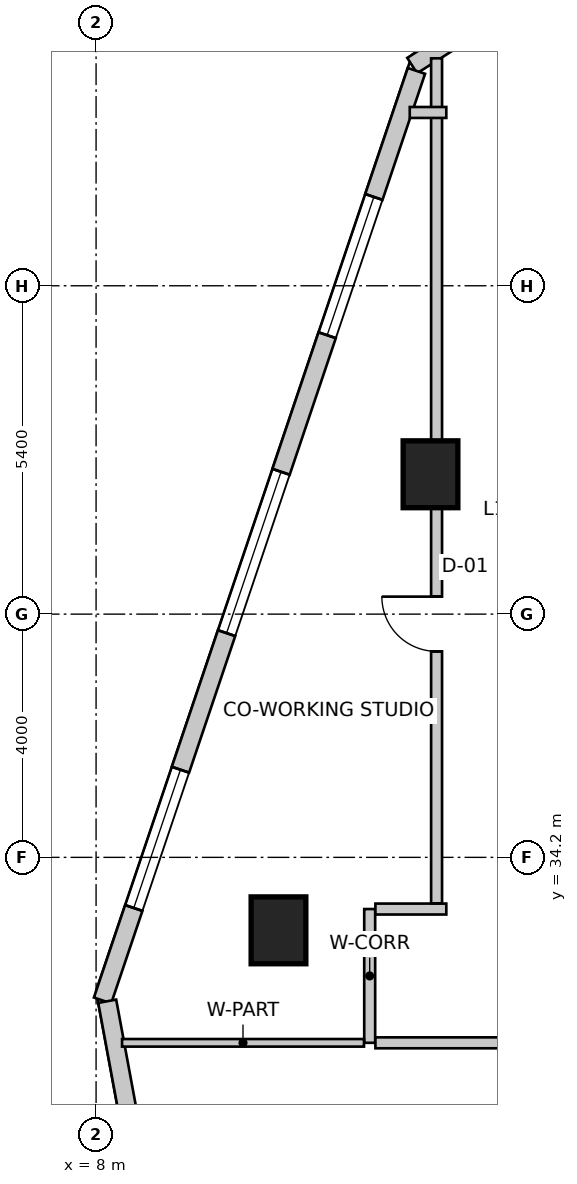
"""IFC4 building model, lengths in metres.
Left out: names, types, materials, properties, quantities, classifications, styles, units other than length and angle.
Written with IfcOpenShell. Run it as: python <this file> out.ifc"""

import sys

from ifc_helpers import new_model, si_unit, direction, frame, frame_2d, origin, origin_2d, place, context, subcontext, project, spatial, rectangle, extrude, source, transform, mapped, element, fill, save


model = new_model("IFC4")
c1 = context("Model", 3, precision=1e-05, world=origin(), true_north=direction((0.0, 1.0)))
c2 = subcontext(c1, "Body", "Model", "MODEL_VIEW")
j1 = project(units=[si_unit("LENGTHUNIT", "METRE"), si_unit("PLANEANGLEUNIT", "RADIAN")], contexts=[c1])
p1 = place(None, origin())
s1 = spatial("IfcSite", under=j1, at=p1, CompositionType="ELEMENT")
p2 = place(p1, origin())
s2 = spatial("IfcBuilding", under=s1, at=p2, CompositionType="ELEMENT")
p3 = place(p2, frame((0.0, 0.0, 79.0)))
s3 = spatial("IfcBuildingStorey", under=s2, at=p3, CompositionType="ELEMENT", Elevation=79.0)
m1 = source(origin(), c2, "Body", "SweptSolid", [
    extrude(rectangle(XDim=0.9, YDim=1.1, at=origin_2d()), origin(), (0.0, 0.0, 1.0), 4.0),
])
for number, where, z_axis, x_axis in (
    (1, (11.0, 33.0, 0.0), (0.0, 0.0, 1.0), (1.0, 0.0, 0.0)),
    (2, (13.5, 40.5, 0.0), (0.0, 0.0, 1.0), (1.0, 0.0, 0.0)),
):
    element("IfcColumn", number, at=place(p3, frame(where, z_axis=z_axis, x_axis=x_axis)), inside=s3, PredefinedType="COLUMN", context=c2, shape_type="MappedRepresentation", body=[
        mapped(m1, transform((0.0, 0.0, 0.0), scale=1.0)),
    ])
p4 = place(p3, frame((21.875, 52.742, 0.0), z_axis=(0.0, 0.0, 1.0), x_axis=(-0.843662465249, -0.536873956092, 0.0)))
e3 = element("IfcWall", 3, at=p4, inside=s3, PredefinedType="SOLIDWALL", context=c2, shape_type="SweptSolid", body=[
    extrude(rectangle(XDim=10.284, YDim=0.3, at=frame_2d((5.142, 0.0))), origin(), (0.0, 0.0, 1.0), 3.75),
])
m2 = source(origin(), c2, "Body", "SweptSolid", [
    extrude(rectangle(XDim=1.2, YDim=1.6, at=frame_2d((0.6, 0.8))), frame((0.0, 0.16, 0.0), z_axis=(0.0, -1.0, 0.0), x_axis=(1.0, 0.0, 0.0)), (0.0, 0.0, 1.0), 0.32),
])
p5 = place(p4, frame((0.479, 0.0, 0.85)))
e4 = element("IfcOpeningElement", 4, at=p5, cuts=e3, PredefinedType="OPENING", context=c2, shape_type="MappedRepresentation", body=[
    mapped(m2, transform((0.0, 0.0, 0.0), scale=1.0)),
])
m3 = source(origin(), c2, "Body", "SweptSolid", [
    extrude(rectangle(XDim=2.8, YDim=2.4, at=frame_2d((1.4, 1.2))), frame((0.0, 0.16, 0.0), z_axis=(0.0, -1.0, 0.0), x_axis=(1.0, 0.0, 0.0)), (0.0, 0.0, 1.0), 0.32),
])
p6 = place(p4, frame((3.342, 0.0, 0.85)))
e5 = element("IfcOpeningElement", 5, at=p6, cuts=e3, PredefinedType="OPENING", context=c2, shape_type="MappedRepresentation", body=[
    mapped(m3, transform((0.0, 0.0, 0.0), scale=1.0)),
])
m4 = source(origin(), c2, "Body", "SweptSolid", [
    extrude(rectangle(XDim=1.8, YDim=2.1, at=frame_2d((0.9, 1.05))), frame((0.0, 0.16, 0.0), z_axis=(0.0, -1.0, 0.0), x_axis=(1.0, 0.0, 0.0)), (0.0, 0.0, 1.0), 0.32),
])
p7 = place(p4, frame((7.753, 0.0, 0.85)))
e6 = element("IfcOpeningElement", 6, at=p7, cuts=e3, PredefinedType="OPENING", context=c2, shape_type="MappedRepresentation", body=[
    mapped(m4, transform((0.0, 0.0, 0.0), scale=1.0)),
])
p8 = place(p3, frame((13.269, 47.134, 0.0), z_axis=(0.0, 0.0, 1.0), x_axis=(-0.319920423265, -0.947444416722, 0.0)))
e7 = element("IfcWall", 7, at=p8, inside=s3, PredefinedType="SOLIDWALL", context=c2, shape_type="SweptSolid", body=[
    extrude(rectangle(XDim=16.135, YDim=0.3, at=frame_2d((8.067, 0.0))), origin(), (0.0, 0.0, 1.0), 3.75),
])
m5 = source(origin(), c2, "Body", "SweptSolid", [
    extrude(rectangle(XDim=2.4, YDim=2.2, at=frame_2d((1.2, 1.1))), frame((0.0, 0.16, 0.0), z_axis=(0.0, -1.0, 0.0), x_axis=(1.0, 0.0, 0.0)), (0.0, 0.0, 1.0), 0.32),
])
p9 = place(p8, frame((2.188, 0.0, 0.85)))
e8 = element("IfcOpeningElement", 8, at=p9, cuts=e7, PredefinedType="OPENING", context=c2, shape_type="MappedRepresentation", body=[
    mapped(m5, transform((0.0, 0.0, 0.0), scale=1.0)),
])
p10 = place(p8, frame((6.959, 0.0, 0.85)))
e9 = element("IfcOpeningElement", 9, at=p10, cuts=e7, PredefinedType="OPENING", context=c2, shape_type="MappedRepresentation", body=[
    mapped(m3, transform((0.0, 0.0, 0.0), scale=1.0)),
])
p11 = place(p8, frame((12.13, 0.0, 0.85)))
e10 = element("IfcOpeningElement", 10, at=p11, cuts=e7, PredefinedType="OPENING", context=c2, shape_type="MappedRepresentation", body=[
    mapped(m5, transform((0.0, 0.0, 0.0), scale=1.0)),
])
p12 = place(p3, frame((8.183, 31.833, 0.0), z_axis=(0.0, 0.0, 1.0), x_axis=(0.18216364648, -0.983268226834, 0.0)))
e11 = element("IfcWall", 11, at=p12, inside=s3, PredefinedType="SOLIDWALL", context=c2, shape_type="SweptSolid", body=[
    extrude(rectangle(XDim=26.678, YDim=0.3, at=frame_2d((13.339, 0.0))), origin(), (0.0, 0.0, 1.0), 3.75),
])
p13 = place(p12, frame((2.952, 0.0, 0.85)))
e12 = element("IfcOpeningElement", 12, at=p13, cuts=e11, PredefinedType="OPENING", context=c2, shape_type="MappedRepresentation", body=[
    mapped(m3, transform((0.0, 0.0, 0.0), scale=1.0)),
])
p14 = place(p12, frame((8.876, 0.0, 0.85)))
e13 = element("IfcOpeningElement", 13, at=p14, cuts=e11, PredefinedType="OPENING", context=c2, shape_type="MappedRepresentation", body=[
    mapped(m3, transform((0.0, 0.0, 0.0), scale=1.0)),
])
p15 = place(p12, frame((13.453, 0.0, 0.85)))
e14 = element("IfcOpeningElement", 14, at=p15, cuts=e11, PredefinedType="OPENING", context=c2, shape_type="MappedRepresentation", body=[
    mapped(m3, transform((0.0, 0.0, 0.0), scale=1.0)),
])
p16 = place(p12, frame((18.211, 0.0, 0.85)))
e15 = element("IfcOpeningElement", 15, at=p16, cuts=e11, PredefinedType="OPENING", context=c2, shape_type="MappedRepresentation", body=[
    mapped(m3, transform((0.0, 0.0, 0.0), scale=1.0)),
])
p17 = place(p12, frame((22.909, 0.0, 0.85)))
e16 = element("IfcOpeningElement", 16, at=p17, cuts=e11, PredefinedType="OPENING", context=c2, shape_type="MappedRepresentation", body=[
    mapped(m5, transform((0.0, 0.0, 0.0), scale=1.0)),
])
p18 = place(p3, frame((12.5, 31.15, 0.0), z_axis=(0.0, 0.0, 1.0), x_axis=(0.0, 1.0, 0.0)))
e17 = element("IfcWall", 17, at=p18, inside=s3, PredefinedType="PARTITIONING", context=c2, shape_type="SweptSolid", body=[
    extrude(rectangle(XDim=2.2, YDim=0.18, at=frame_2d((1.1, 0.0))), origin(), (0.0, 0.0, 1.0), 3.419),
])
p19 = place(p3, frame((12.594, 33.35, 0.0), z_axis=(0.0, 0.0, 1.0), x_axis=(1.0, 0.0, 0.0)))
e18 = element("IfcWall", 18, at=p19, inside=s3, PredefinedType="PARTITIONING", context=c2, shape_type="SweptSolid", body=[
    extrude(rectangle(XDim=1.166, YDim=0.18, at=frame_2d((0.583, 0.0))), origin(), (0.0, 0.0, 1.0), 3.75),
])
p20 = place(p3, frame((17.96, 31.15, 0.0), z_axis=(0.0, 0.0, 1.0), x_axis=(-1.0, 0.0, 0.0)))
e19 = element("IfcWall", 19, at=p20, inside=s3, PredefinedType="PARTITIONING", context=c2, shape_type="SweptSolid", body=[
    extrude(rectangle(XDim=5.366, YDim=0.18, at=frame_2d((2.683, 0.0))), origin(), (0.0, 0.0, 1.0), 3.419),
])
p21 = place(p3, frame((13.6, 33.444, 0.0), z_axis=(0.0, 0.0, 1.0), x_axis=(0.0, 1.0, 0.0)))
e20 = element("IfcWall", 20, at=p21, inside=s3, PredefinedType="PARTITIONING", context=c2, shape_type="SweptSolid", body=[
    extrude(rectangle(XDim=13.896, YDim=0.18, at=frame_2d((6.948, 0.0))), origin(), (0.0, 0.0, 1.0), 2.892),
])
m6 = source(origin(), c2, "Body", "SweptSolid", [
    extrude(rectangle(XDim=0.9, YDim=2.15, at=frame_2d((0.45, 1.075))), frame((0.0, 0.1, 0.0), z_axis=(0.0, -1.0, 0.0), x_axis=(1.0, 0.0, 0.0)), (0.0, 0.0, 1.0), 0.2),
])
p22 = place(p21, frame((4.144, 0.0, 0.0)))
e21 = element("IfcOpeningElement", 21, at=p22, cuts=e20, PredefinedType="OPENING", context=c2, shape_type="MappedRepresentation", body=[
    mapped(m6, transform((0.0, 0.0, 0.0), scale=1.0)),
])
p23 = place(p3, frame((13.76, 46.45, 0.0), z_axis=(0.0, 0.0, 1.0), x_axis=(-1.0, 0.0, 0.0)))
e22 = element("IfcWall", 22, at=p23, inside=s3, PredefinedType="PARTITIONING", context=c2, shape_type="SweptSolid", body=[
    extrude(rectangle(XDim=0.601, YDim=0.18, at=frame_2d((0.301, 0.0))), origin(), (0.0, 0.0, 1.0), 3.75),
])
p24 = place(p3, frame((12.406, 31.15, 0.0), z_axis=(0.0, 0.0, 1.0), x_axis=(-1.0, 0.0, 0.0)))
e23 = element("IfcWall", 23, at=p24, inside=s3, PredefinedType="PARTITIONING", context=c2, shape_type="SweptSolid", body=[
    extrude(rectangle(XDim=3.979, YDim=0.125, at=frame_2d((1.99, 0.0))), origin(), (0.0, 0.0, 1.0), 2.892),
])
m7 = source(origin(), c2, "Body", "SweptSolid", [
    extrude(rectangle(XDim=2.4, YDim=2.2, at=frame_2d((1.2, 1.1))), frame((0.0, -0.015, 0.0), z_axis=(0.0, -1.0, 0.0), x_axis=(1.0, 0.0, 0.0)), (0.0, 0.0, 1.0), 0.06),
])
p25 = place(p9, origin())
e24 = element("IfcWindow", 24, at=p25, inside=s3, PartitioningType="SINGLE_PANEL", PredefinedType="WINDOW", context=c2, shape_type="MappedRepresentation", body=[
    mapped(m7, transform((0.0, 0.0, 0.0), scale=1.0)),
])
fill(e8, e24)
m8 = source(origin(), c2, "Body", "SweptSolid", [
    extrude(rectangle(XDim=2.8, YDim=2.4, at=frame_2d((1.4, 1.2))), frame((0.0, -0.015, 0.0), z_axis=(0.0, -1.0, 0.0), x_axis=(1.0, 0.0, 0.0)), (0.0, 0.0, 1.0), 0.06),
])
p26 = place(p10, origin())
e25 = element("IfcWindow", 25, at=p26, inside=s3, PartitioningType="SINGLE_PANEL", PredefinedType="WINDOW", context=c2, shape_type="MappedRepresentation", body=[
    mapped(m8, transform((0.0, 0.0, 0.0), scale=1.0)),
])
fill(e9, e25)
p27 = place(p11, origin())
e26 = element("IfcWindow", 26, at=p27, inside=s3, PartitioningType="SINGLE_PANEL", PredefinedType="WINDOW", context=c2, shape_type="MappedRepresentation", body=[
    mapped(m7, transform((0.0, 0.0, 0.0), scale=1.0)),
])
fill(e10, e26)
m9 = source(origin(), c2, "Body", "SweptSolid", [
    extrude(rectangle(XDim=0.9, YDim=2.15, at=frame_2d((0.45, 1.075))), frame((0.0, 0.025, 0.0), z_axis=(0.0, -1.0, 0.0), x_axis=(1.0, 0.0, 0.0)), (0.0, 0.0, 1.0), 0.05),
])
p28 = place(p22, origin())
e27 = element("IfcDoor", 27, at=p28, inside=s3, OperationType="SINGLE_SWING_RIGHT", PredefinedType="DOOR", context=c2, shape_type="MappedRepresentation", body=[
    mapped(m9, transform((0.0, 0.0, 0.0), scale=1.0)),
])
fill(e21, e27)
save(model, sys.argv[1])
